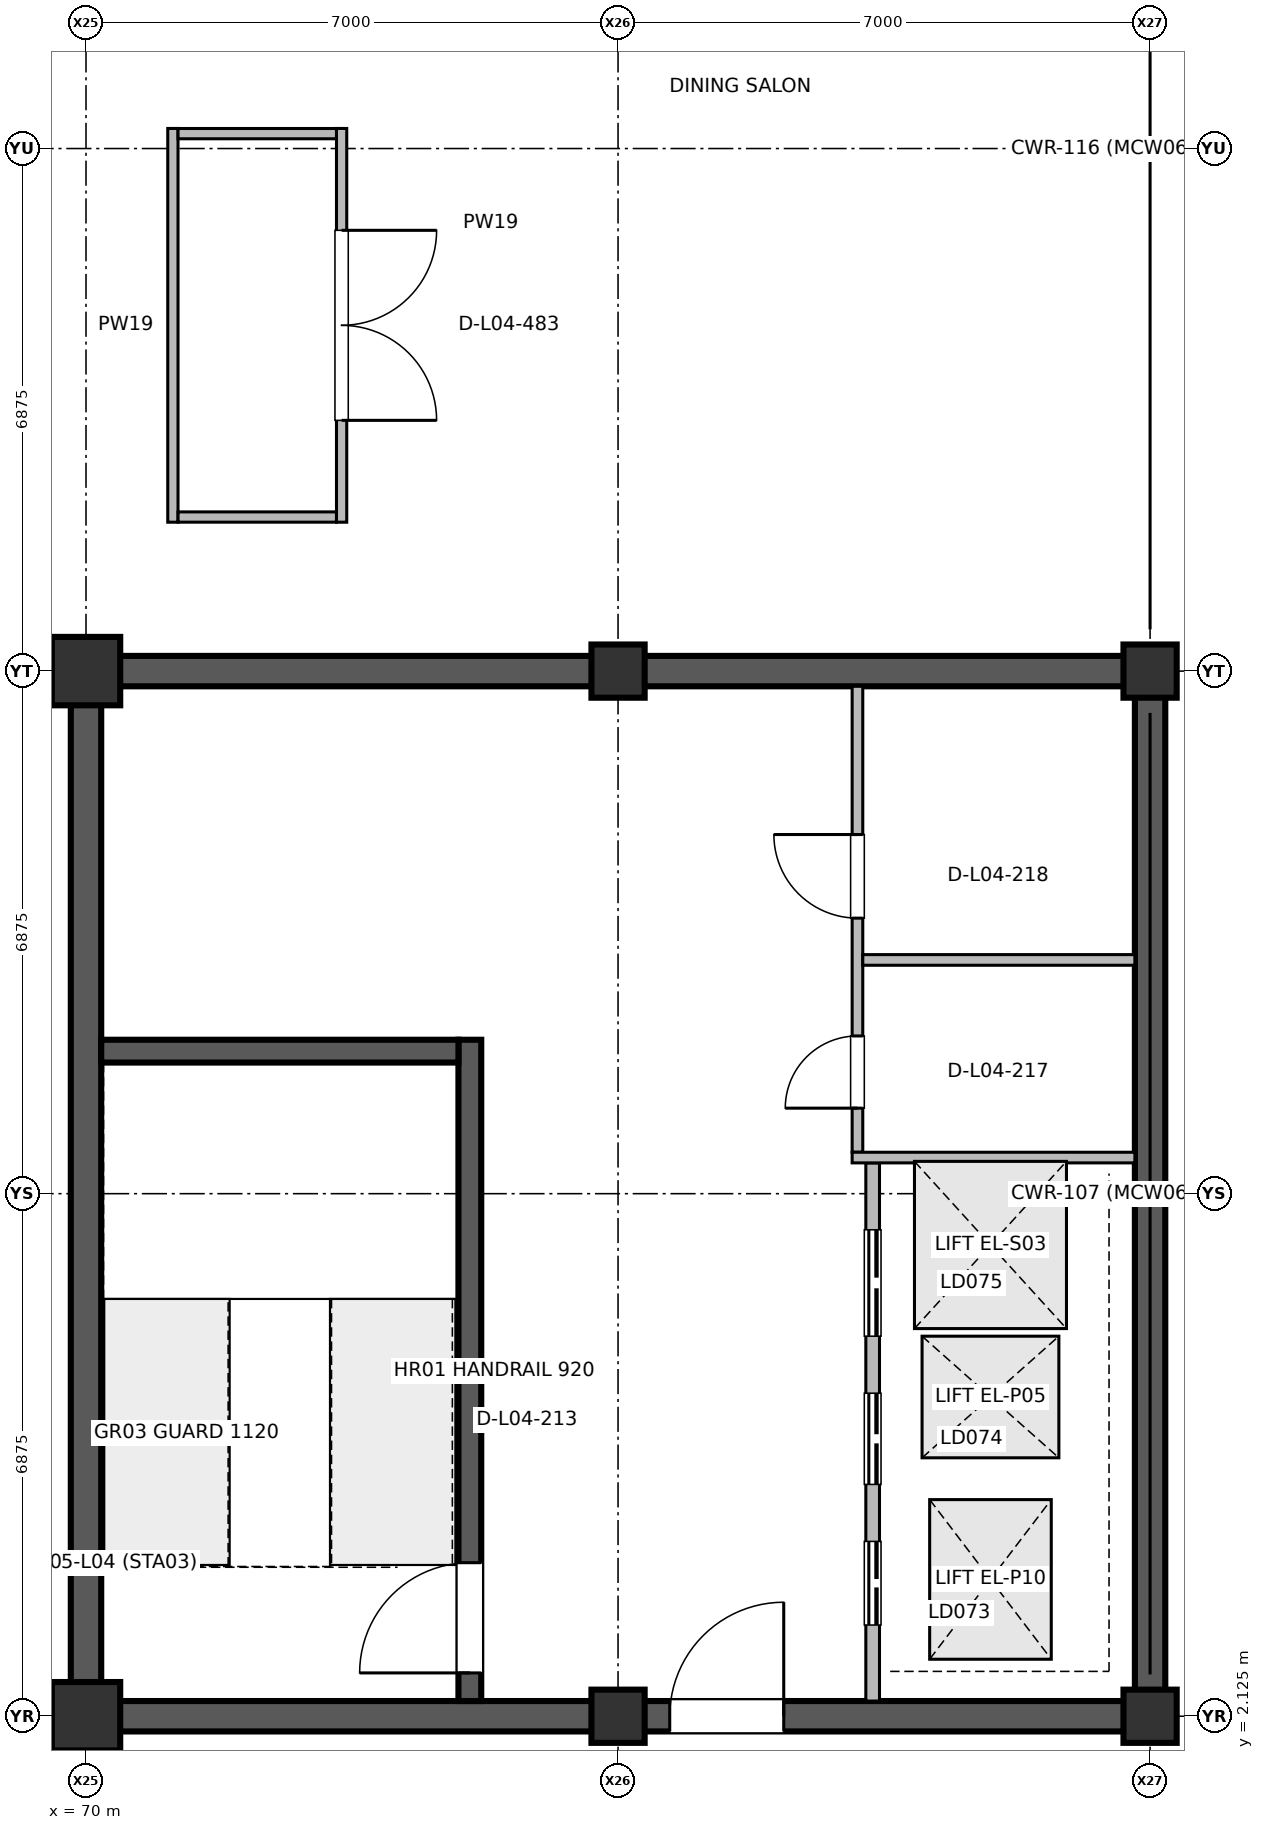
"""IFC4 building model, lengths in metres.
Left out: names, types, materials, properties, quantities, classifications, styles, units other than length and angle.
Written with IfcOpenShell. Run it as: python <this file> out.ifc"""

import sys

from ifc_helpers import new_model, si_unit, direction, frame, frame_2d, origin, origin_2d, place, context, subcontext, project, spatial, rectangle, extrude, element, fill, save


model = new_model("IFC4")
c1 = context("Model", 3, precision=1e-05, world=origin(), true_north=direction((0.0, 1.0)))
c2 = subcontext(c1, "Body", "Model", "MODEL_VIEW")
j1 = project(units=[si_unit("LENGTHUNIT", "METRE"), si_unit("PLANEANGLEUNIT", "RADIAN")], contexts=[c1])
p1 = place(None, origin())
s1 = spatial("IfcSite", under=j1, at=p1, CompositionType="ELEMENT")
p2 = place(p1, origin())
s2 = spatial("IfcBuilding", under=s1, at=p2, CompositionType="ELEMENT")
p3 = place(p2, frame((0.0, 0.0, 16.2)))
s3 = spatial("IfcBuildingStorey", under=s2, at=p3, CompositionType="ELEMENT", Elevation=16.2)
for number, where, z_axis, x_axis in (
    (1, (70.0, 2.125, 0.0), (0.0, 0.0, 1.0), (1.0, 0.0, 0.0)),
    (2, (70.0, 15.875, 0.0), (0.0, 0.0, 1.0), (1.0, 0.0, 0.0)),
):
    element("IfcColumn", number, at=place(p3, frame(where, z_axis=z_axis, x_axis=x_axis)), inside=s3, PredefinedType="COLUMN", context=c2, shape_type="SweptSolid", body=[
        extrude(rectangle(XDim=0.9, YDim=0.9, at=origin_2d()), origin(), (0.0, 0.0, 1.0), 4.798),
    ])
for number, where, z_axis, x_axis in (
    (3, (77.0, 2.125, 0.0), (0.0, 0.0, 1.0), (1.0, 0.0, 0.0)),
    (4, (77.0, 15.875, 0.0), (0.0, 0.0, 1.0), (1.0, 0.0, 0.0)),
):
    element("IfcColumn", number, at=place(p3, frame(where, z_axis=z_axis, x_axis=x_axis)), inside=s3, PredefinedType="COLUMN", context=c2, shape_type="SweptSolid", body=[
        extrude(rectangle(XDim=0.7, YDim=0.7, at=origin_2d()), origin(), (0.0, 0.0, 1.0), 4.6),
    ])
for number, where, z_axis, x_axis in (
    (5, (84.0, 2.125, 0.0), (0.0, 0.0, 1.0), (1.0, 0.0, 0.0)),
    (6, (84.0, 15.875, 0.0), (0.0, 0.0, 1.0), (1.0, 0.0, 0.0)),
):
    element("IfcColumn", number, at=place(p3, frame(where, z_axis=z_axis, x_axis=x_axis)), inside=s3, PredefinedType="COLUMN", context=c2, shape_type="SweptSolid", body=[
        extrude(rectangle(XDim=0.7, YDim=0.7, at=origin_2d()), origin(), (0.0, 0.0, 1.0), 4.798),
    ])
for number, where, z_axis, x_axis in (
    (7, (70.0, 2.325, 0.0), (0.0, 0.0, 1.0), (0.0, 1.0, 0.0)),
    (8, (84.0, 2.325, 0.0), (0.0, 0.0, 1.0), (0.0, 1.0, 0.0)),
):
    element("IfcWall", number, at=place(p3, frame(where, z_axis=z_axis, x_axis=x_axis)), inside=s3, PredefinedType="SHEAR", context=c2, shape_type="SweptSolid", body=[
        extrude(rectangle(XDim=13.35, YDim=0.4, at=frame_2d((6.675, 0.0))), origin(), (0.0, 0.0, 1.0), 4.6),
    ])
p4 = place(p3, frame((70.2, 2.125, 0.0), z_axis=(0.0, 0.0, 1.0), x_axis=(1.0, 0.0, 0.0)))
e9 = element("IfcWall", 9, at=p4, inside=s3, PredefinedType="SHEAR", context=c2, shape_type="SweptSolid", body=[
    extrude(rectangle(XDim=13.6, YDim=0.4, at=frame_2d((6.8, 0.0))), origin(), (0.0, 0.0, 1.0), 4.6),
])
p5 = place(p4, frame((7.48, 0.0, 0.0)))
e10 = element("IfcOpeningElement", 10, at=p5, cuts=e9, PredefinedType="OPENING", context=c2, shape_type="SweptSolid", body=[
    extrude(rectangle(XDim=1.5, YDim=2.2, at=frame_2d((0.75, 1.1))), frame((0.0, 0.21, 0.0), z_axis=(0.0, -1.0, 0.0), x_axis=(1.0, 0.0, 0.0)), (0.0, 0.0, 1.0), 0.42),
])
p6 = place(p3, frame((70.2, 15.875, 0.0), z_axis=(0.0, 0.0, 1.0), x_axis=(1.0, 0.0, 0.0)))
e11 = element("IfcWall", 11, at=p6, inside=s3, PredefinedType="SHEAR", context=c2, shape_type="SweptSolid", body=[
    extrude(rectangle(XDim=13.6, YDim=0.4, at=frame_2d((6.8, 0.0))), origin(), (0.0, 0.0, 1.0), 4.6),
])
p7 = place(p3, frame((75.05, 2.325, 0.0), z_axis=(0.0, 0.0, 1.0), x_axis=(0.0, 1.0, 0.0)))
e12 = element("IfcWall", 12, at=p7, inside=s3, PredefinedType="SHEAR", context=c2, shape_type="SweptSolid", body=[
    extrude(rectangle(XDim=8.7, YDim=0.3, at=frame_2d((4.35, 0.0))), origin(), (0.0, 0.0, 1.0), 4.6),
])
p8 = place(p7, frame((0.37, 0.0, 0.0)))
e13 = element("IfcOpeningElement", 13, at=p8, cuts=e12, PredefinedType="OPENING", context=c2, shape_type="SweptSolid", body=[
    extrude(rectangle(XDim=1.45, YDim=2.2, at=frame_2d((0.725, 1.1))), frame((0.0, 0.16, 0.0), z_axis=(0.0, -1.0, 0.0), x_axis=(1.0, 0.0, 0.0)), (0.0, 0.0, 1.0), 0.32),
])
p9 = place(p3, frame((80.35, 2.325, 0.0), z_axis=(0.0, 0.0, 1.0), x_axis=(0.0, 1.0, 0.0)))
e14 = element("IfcWall", 14, at=p9, inside=s3, PredefinedType="PARTITIONING", context=c2, shape_type="SweptSolid", body=[
    extrude(rectangle(XDim=7.08, YDim=0.18, at=frame_2d((3.54, 0.0))), origin(), (0.0, 0.0, 1.0), 3.82),
])
p10 = place(p9, frame((1.0, 0.0, 0.0)))
e15 = element("IfcOpeningElement", 15, at=p10, cuts=e14, PredefinedType="OPENING", context=c2, shape_type="SweptSolid", body=[
    extrude(rectangle(XDim=1.1, YDim=2.2, at=frame_2d((0.55, 1.1))), frame((0.0, 0.1, 0.0), z_axis=(0.0, -1.0, 0.0), x_axis=(1.0, 0.0, 0.0)), (0.0, 0.0, 1.0), 0.2),
])
p11 = place(p9, frame((2.85, 0.0, 0.0)))
e16 = element("IfcOpeningElement", 16, at=p11, cuts=e14, PredefinedType="OPENING", context=c2, shape_type="SweptSolid", body=[
    extrude(rectangle(XDim=1.2, YDim=2.25, at=frame_2d((0.6, 1.125))), frame((0.0, 0.1, 0.0), z_axis=(0.0, -1.0, 0.0), x_axis=(1.0, 0.0, 0.0)), (0.0, 0.0, 1.0), 0.2),
])
p12 = place(p9, frame((4.8, 0.0, 0.0)))
e17 = element("IfcOpeningElement", 17, at=p12, cuts=e14, PredefinedType="OPENING", context=c2, shape_type="SweptSolid", body=[
    extrude(rectangle(XDim=1.4, YDim=2.3, at=frame_2d((0.7, 1.15))), frame((0.0, 0.1, 0.0), z_axis=(0.0, -1.0, 0.0), x_axis=(1.0, 0.0, 0.0)), (0.0, 0.0, 1.0), 0.2),
])
p13 = place(p3, frame((80.15, 9.545, 0.0), z_axis=(0.0, 0.0, 1.0), x_axis=(0.0, 1.0, 0.0)))
e18 = element("IfcWall", 18, at=p13, inside=s3, PredefinedType="PARTITIONING", context=c2, shape_type="SweptSolid", body=[
    extrude(rectangle(XDim=6.13, YDim=0.14, at=frame_2d((3.065, 0.0))), origin(), (0.0, 0.0, 1.0), 3.82),
])
p14 = place(p13, frame((0.58, 0.0, 0.0)))
e19 = element("IfcOpeningElement", 19, at=p14, cuts=e18, PredefinedType="OPENING", context=c2, shape_type="SweptSolid", body=[
    extrude(rectangle(XDim=0.95, YDim=2.15, at=frame_2d((0.475, 1.075))), frame((0.0, 0.08, 0.0), z_axis=(0.0, -1.0, 0.0), x_axis=(1.0, 0.0, 0.0)), (0.0, 0.0, 1.0), 0.16),
])
p15 = place(p13, frame((3.08, 0.0, 0.0)))
e20 = element("IfcOpeningElement", 20, at=p15, cuts=e18, PredefinedType="OPENING", context=c2, shape_type="SweptSolid", body=[
    extrude(rectangle(XDim=1.1, YDim=2.15, at=frame_2d((0.55, 1.075))), frame((0.0, 0.08, 0.0), z_axis=(0.0, -1.0, 0.0), x_axis=(1.0, 0.0, 0.0)), (0.0, 0.0, 1.0), 0.16),
])
p16 = place(p3, frame((73.363, 23.014, 0.0), z_axis=(0.0, 0.0, 1.0), x_axis=(0.0, -1.0, 0.0)))
e21 = element("IfcWall", 21, at=p16, inside=s3, PredefinedType="PARTITIONING", context=c2, shape_type="SweptSolid", body=[
    extrude(rectangle(XDim=5.18, YDim=0.135, at=frame_2d((2.59, 0.0))), origin(), (0.0, 0.0, 1.0), 3.82),
])
p17 = place(p16, frame((1.34, 0.0, 0.0)))
e22 = element("IfcOpeningElement", 22, at=p17, cuts=e21, PredefinedType="OPENING", context=c2, shape_type="SweptSolid", body=[
    extrude(rectangle(XDim=2.5, YDim=2.5, at=frame_2d((1.25, 1.25))), frame((0.0, 0.077, 0.0), z_axis=(0.0, -1.0, 0.0), x_axis=(1.0, 0.0, 0.0)), (0.0, 0.0, 1.0), 0.155),
])
p18 = place(p3, frame((80.08, 9.475, 0.0), z_axis=(0.0, 0.0, 1.0), x_axis=(1.0, 0.0, 0.0)))
e23 = element("IfcWall", 23, at=p18, inside=s3, PredefinedType="PARTITIONING", context=c2, shape_type="SweptSolid", body=[
    extrude(rectangle(XDim=3.72, YDim=0.14, at=frame_2d((1.86, 0.0))), origin(), (0.0, 0.0, 1.0), 3.82),
])
p19 = place(p3, frame((80.22, 12.075, 0.0), z_axis=(0.0, 0.0, 1.0), x_axis=(1.0, 0.0, 0.0)))
e24 = element("IfcWall", 24, at=p19, inside=s3, PredefinedType="PARTITIONING", context=c2, shape_type="SweptSolid", body=[
    extrude(rectangle(XDim=3.58, YDim=0.14, at=frame_2d((1.79, 0.0))), origin(), (0.0, 0.0, 1.0), 3.82),
])
p20 = place(p3, frame((71.143, 17.834, 0.0), z_axis=(0.0, 0.0, 1.0), x_axis=(0.0, 1.0, 0.0)))
e25 = element("IfcWall", 25, at=p20, inside=s3, PredefinedType="PARTITIONING", context=c2, shape_type="SweptSolid", body=[
    extrude(rectangle(XDim=5.18, YDim=0.135, at=frame_2d((2.59, 0.0))), origin(), (0.0, 0.0, 1.0), 3.82),
])
for number, where, z_axis, x_axis in (
    (26, (71.211, 17.902, 0.0), (0.0, 0.0, 1.0), (1.0, 0.0, 0.0)),
    (27, (71.211, 22.946, 0.0), (0.0, 0.0, 1.0), (1.0, 0.0, 0.0)),
):
    element("IfcWall", number, at=place(p3, frame(where, z_axis=z_axis, x_axis=x_axis)), inside=s3, PredefinedType="PARTITIONING", context=c2, shape_type="SweptSolid", body=[
        extrude(rectangle(XDim=2.084, YDim=0.135, at=frame_2d((1.042, 0.0))), origin(), (0.0, 0.0, 1.0), 3.82),
    ])
p21 = place(p3, frame((70.2, 10.875, 0.0), z_axis=(0.0, 0.0, 1.0), x_axis=(1.0, 0.0, 0.0)))
e28 = element("IfcWall", 28, at=p21, inside=s3, PredefinedType="SHEAR", context=c2, shape_type="SweptSolid", body=[
    extrude(rectangle(XDim=4.7, YDim=0.3, at=frame_2d((2.35, 0.0))), origin(), (0.0, 0.0, 1.0), 4.6),
])
p22 = place(p5, origin())
e29 = element("IfcDoor", 29, at=p22, inside=s3, OperationType="SINGLE_SWING_RIGHT", PredefinedType="DOOR", context=c2, shape_type="SweptSolid", body=[
    extrude(rectangle(XDim=1.5, YDim=2.2, at=frame_2d((0.75, 1.1))), frame((0.0, 0.025, 0.0), z_axis=(0.0, -1.0, 0.0), x_axis=(1.0, 0.0, 0.0)), (0.0, 0.0, 1.0), 0.05),
])
fill(e10, e29)
p23 = place(p8, origin())
e30 = element("IfcDoor", 30, at=p23, inside=s3, OperationType="SINGLE_SWING_LEFT", PredefinedType="DOOR", context=c2, shape_type="SweptSolid", body=[
    extrude(rectangle(XDim=1.45, YDim=2.2, at=frame_2d((0.725, 1.1))), frame((0.0, 0.025, 0.0), z_axis=(0.0, -1.0, 0.0), x_axis=(1.0, 0.0, 0.0)), (0.0, 0.0, 1.0), 0.05),
])
fill(e13, e30)
p24 = place(p10, origin())
e31 = element("IfcDoor", 31, at=p24, inside=s3, OperationType="DOUBLE_DOOR_SLIDING", PredefinedType="DOOR", context=c2, shape_type="SweptSolid", body=[
    extrude(rectangle(XDim=1.1, YDim=2.2, at=frame_2d((0.55, 1.1))), frame((0.0, 0.025, 0.0), z_axis=(0.0, -1.0, 0.0), x_axis=(1.0, 0.0, 0.0)), (0.0, 0.0, 1.0), 0.05),
])
fill(e15, e31)
p25 = place(p11, origin())
e32 = element("IfcDoor", 32, at=p25, inside=s3, OperationType="DOUBLE_DOOR_SLIDING", PredefinedType="DOOR", context=c2, shape_type="SweptSolid", body=[
    extrude(rectangle(XDim=1.2, YDim=2.25, at=frame_2d((0.6, 1.125))), frame((0.0, 0.025, 0.0), z_axis=(0.0, -1.0, 0.0), x_axis=(1.0, 0.0, 0.0)), (0.0, 0.0, 1.0), 0.05),
])
fill(e16, e32)
p26 = place(p12, origin())
e33 = element("IfcDoor", 33, at=p26, inside=s3, OperationType="DOUBLE_DOOR_SLIDING", PredefinedType="DOOR", context=c2, shape_type="SweptSolid", body=[
    extrude(rectangle(XDim=1.4, YDim=2.3, at=frame_2d((0.7, 1.15))), frame((0.0, 0.025, 0.0), z_axis=(0.0, -1.0, 0.0), x_axis=(1.0, 0.0, 0.0)), (0.0, 0.0, 1.0), 0.05),
])
fill(e17, e33)
p27 = place(p14, origin())
e34 = element("IfcDoor", 34, at=p27, inside=s3, OperationType="SINGLE_SWING_LEFT", PredefinedType="DOOR", context=c2, shape_type="SweptSolid", body=[
    extrude(rectangle(XDim=0.95, YDim=2.15, at=frame_2d((0.475, 1.075))), frame((0.0, 0.025, 0.0), z_axis=(0.0, -1.0, 0.0), x_axis=(1.0, 0.0, 0.0)), (0.0, 0.0, 1.0), 0.05),
])
fill(e19, e34)
p28 = place(p15, origin())
e35 = element("IfcDoor", 35, at=p28, inside=s3, OperationType="SINGLE_SWING_RIGHT", PredefinedType="DOOR", context=c2, shape_type="SweptSolid", body=[
    extrude(rectangle(XDim=1.1, YDim=2.15, at=frame_2d((0.55, 1.075))), frame((0.0, 0.025, 0.0), z_axis=(0.0, -1.0, 0.0), x_axis=(1.0, 0.0, 0.0)), (0.0, 0.0, 1.0), 0.05),
])
fill(e20, e35)
p29 = place(p17, origin())
e36 = element("IfcDoor", 36, at=p29, inside=s3, OperationType="DOUBLE_DOOR_SINGLE_SWING", PredefinedType="DOOR", context=c2, shape_type="SweptSolid", body=[
    extrude(rectangle(XDim=2.5, YDim=2.5, at=frame_2d((1.25, 1.25))), frame((0.0, 0.025, 0.0), z_axis=(0.0, -1.0, 0.0), x_axis=(1.0, 0.0, 0.0)), (0.0, 0.0, 1.0), 0.05),
])
fill(e22, e36)
save(model, sys.argv[1])
